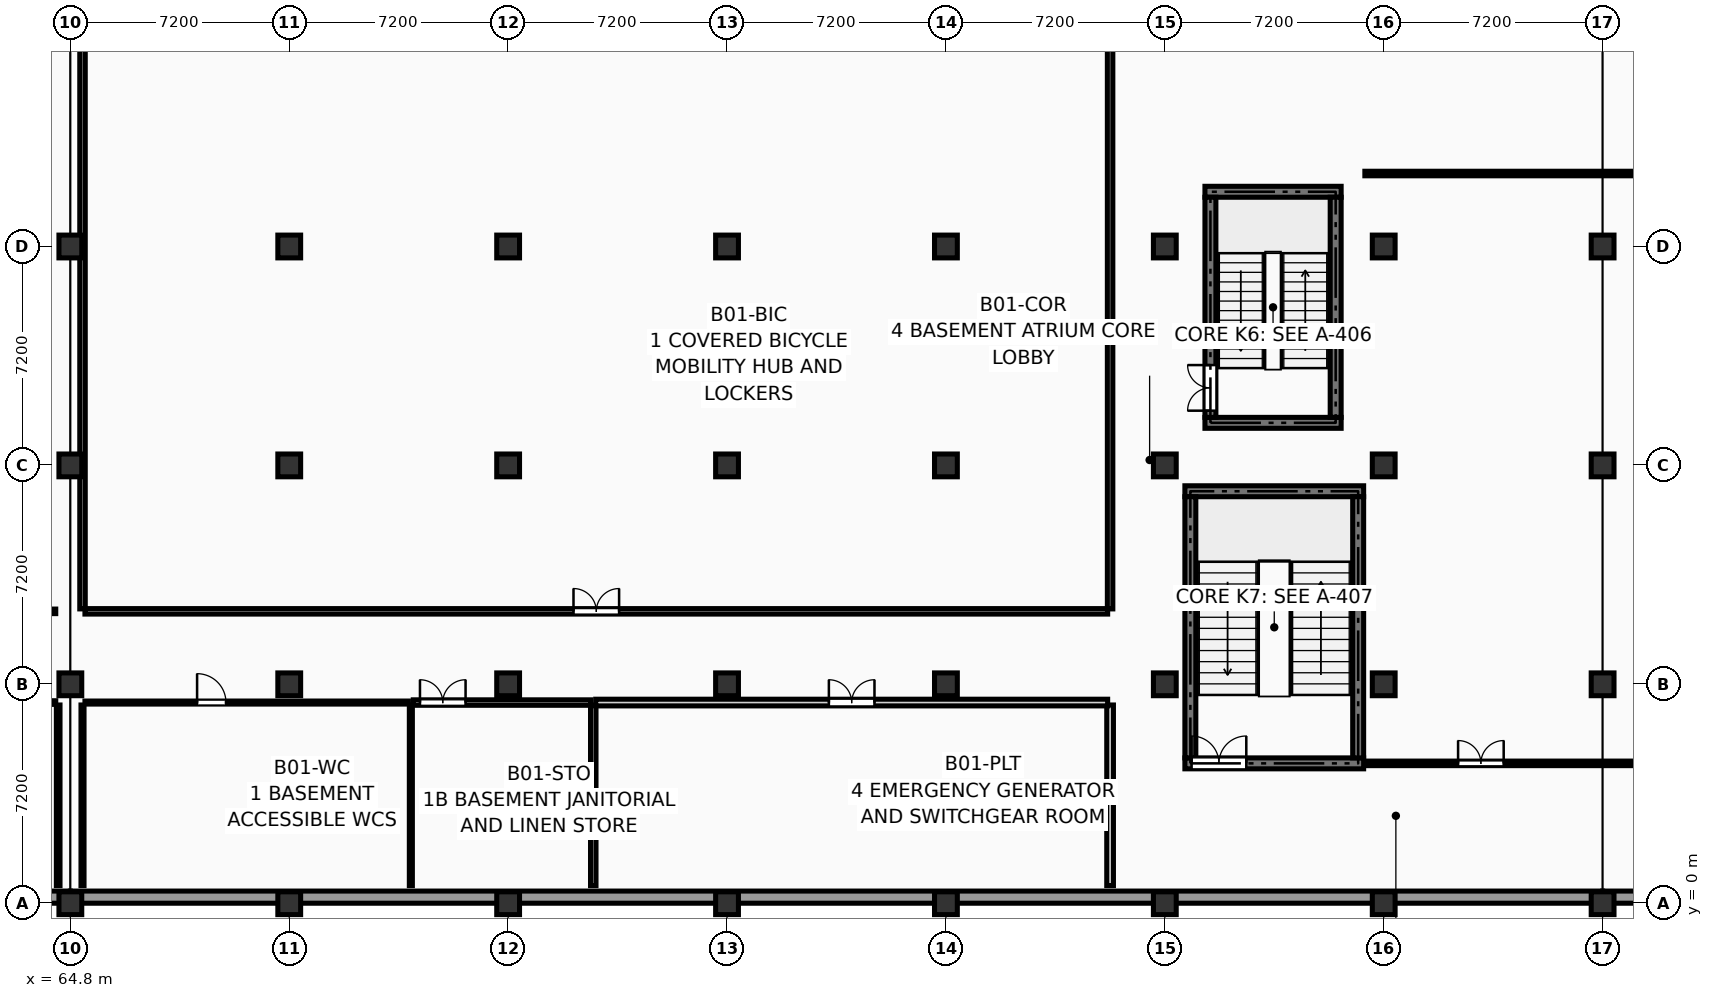
"""IFC4 building model, lengths in metres.
Left out: names, types, materials, properties, quantities, classifications, styles, units other than length and angle.
Written with IfcOpenShell. Run it as: python <this file> out.ifc"""

import sys

from ifc_helpers import new_model, si_unit, direction, frame, frame_2d, origin, origin_2d, place, context, subcontext, project, spatial, rectangle, extrude, element, fill, save


model = new_model("IFC4")
c1 = context("Model", 3, precision=1e-05, world=origin(), true_north=direction((0.0, 1.0)))
c2 = subcontext(c1, "Body", "Model", "MODEL_VIEW")
j1 = project(units=[si_unit("LENGTHUNIT", "METRE"), si_unit("PLANEANGLEUNIT", "RADIAN")], contexts=[c1])
p1 = place(None, origin())
s1 = spatial("IfcSite", under=j1, at=p1, CompositionType="ELEMENT")
p2 = place(p1, origin())
s2 = spatial("IfcBuilding", under=s1, at=p2, CompositionType="ELEMENT")
p3 = place(p2, frame((0.0, 0.0, -4.5)))
s3 = spatial("IfcBuildingStorey", under=s2, at=p3, CompositionType="ELEMENT", Elevation=-4.5)
for number, where, z_axis, x_axis in (
    (1, (64.8, 0.0, -0.3), (0.0, 0.0, 1.0), (1.0, 0.0, 0.0)),
    (2, (64.8, 7.2, -0.3), (0.0, 0.0, 1.0), (1.0, 0.0, 0.0)),
    (3, (64.8, 14.4, -0.3), (0.0, 0.0, 1.0), (1.0, 0.0, 0.0)),
    (4, (64.8, 21.6, -0.3), (0.0, 0.0, 1.0), (1.0, 0.0, 0.0)),
    (5, (72.0, 0.0, -0.3), (0.0, 0.0, 1.0), (1.0, 0.0, 0.0)),
    (6, (72.0, 7.2, -0.3), (0.0, 0.0, 1.0), (1.0, 0.0, 0.0)),
    (7, (72.0, 14.4, -0.3), (0.0, 0.0, 1.0), (1.0, 0.0, 0.0)),
    (8, (72.0, 21.6, -0.3), (0.0, 0.0, 1.0), (1.0, 0.0, 0.0)),
    (9, (79.2, 0.0, -0.3), (0.0, 0.0, 1.0), (1.0, 0.0, 0.0)),
    (10, (79.2, 7.2, -0.3), (0.0, 0.0, 1.0), (1.0, 0.0, 0.0)),
    (11, (79.2, 14.4, -0.3), (0.0, 0.0, 1.0), (1.0, 0.0, 0.0)),
    (12, (79.2, 21.6, -0.3), (0.0, 0.0, 1.0), (1.0, 0.0, 0.0)),
    (13, (86.4, 0.0, -0.3), (0.0, 0.0, 1.0), (1.0, 0.0, 0.0)),
    (14, (86.4, 7.2, -0.3), (0.0, 0.0, 1.0), (1.0, 0.0, 0.0)),
    (15, (86.4, 14.4, -0.3), (0.0, 0.0, 1.0), (1.0, 0.0, 0.0)),
    (16, (86.4, 21.6, -0.3), (0.0, 0.0, 1.0), (1.0, 0.0, 0.0)),
    (17, (93.6, 0.0, -0.3), (0.0, 0.0, 1.0), (1.0, 0.0, 0.0)),
    (18, (93.6, 7.2, -0.3), (0.0, 0.0, 1.0), (1.0, 0.0, 0.0)),
    (19, (93.6, 14.4, -0.3), (0.0, 0.0, 1.0), (1.0, 0.0, 0.0)),
    (20, (93.6, 21.6, -0.3), (0.0, 0.0, 1.0), (1.0, 0.0, 0.0)),
    (21, (100.8, 0.0, -0.3), (0.0, 0.0, 1.0), (1.0, 0.0, 0.0)),
):
    element("IfcColumn", number, at=place(p3, frame(where, z_axis=z_axis, x_axis=x_axis)), inside=s3, PredefinedType="COLUMN", context=c2, shape_type="SweptSolid", body=[
        extrude(rectangle(XDim=0.75, YDim=0.75, at=origin_2d()), origin(), (0.0, 0.0, 1.0), 4.8),
    ])
for number, where, z_axis, x_axis in (
    (22, (100.8, 7.2, 0.0), (0.0, 0.0, 1.0), (1.0, 0.0, 0.0)),
    (23, (100.8, 14.4, 0.0), (0.0, 0.0, 1.0), (1.0, 0.0, 0.0)),
    (24, (100.8, 21.6, 0.0), (0.0, 0.0, 1.0), (1.0, 0.0, 0.0)),
):
    element("IfcColumn", number, at=place(p3, frame(where, z_axis=z_axis, x_axis=x_axis)), inside=s3, PredefinedType="COLUMN", context=c2, shape_type="SweptSolid", body=[
        extrude(rectangle(XDim=0.75, YDim=0.75, at=origin_2d()), origin(), (0.0, 0.0, 1.0), 4.5),
    ])
p4 = place(p3, frame((108.0, 0.0, -0.3), z_axis=(0.0, 0.0, 1.0), x_axis=(1.0, 0.0, 0.0)))
e25 = element("IfcColumn", 25, at=p4, inside=s3, PredefinedType="COLUMN", context=c2, shape_type="SweptSolid", body=[
    extrude(rectangle(XDim=0.75, YDim=0.75, at=origin_2d()), origin(), (0.0, 0.0, 1.0), 4.8),
])
for number, where, z_axis, x_axis in (
    (26, (108.0, 7.2, 0.0), (0.0, 0.0, 1.0), (1.0, 0.0, 0.0)),
    (27, (108.0, 14.4, 0.0), (0.0, 0.0, 1.0), (1.0, 0.0, 0.0)),
    (28, (108.0, 21.6, 0.0), (0.0, 0.0, 1.0), (1.0, 0.0, 0.0)),
):
    element("IfcColumn", number, at=place(p3, frame(where, z_axis=z_axis, x_axis=x_axis)), inside=s3, PredefinedType="COLUMN", context=c2, shape_type="SweptSolid", body=[
        extrude(rectangle(XDim=0.75, YDim=0.75, at=origin_2d()), origin(), (0.0, 0.0, 1.0), 4.5),
    ])
for number, where, z_axis, x_axis in (
    (29, (115.2, 0.0, -0.3), (0.0, 0.0, 1.0), (1.0, 0.0, 0.0)),
    (30, (115.2, 7.2, -0.3), (0.0, 0.0, 1.0), (1.0, 0.0, 0.0)),
    (31, (115.2, 14.4, -0.3), (0.0, 0.0, 1.0), (1.0, 0.0, 0.0)),
    (32, (115.2, 21.6, -0.3), (0.0, 0.0, 1.0), (1.0, 0.0, 0.0)),
):
    element("IfcColumn", number, at=place(p3, frame(where, z_axis=z_axis, x_axis=x_axis)), inside=s3, PredefinedType="COLUMN", context=c2, shape_type="SweptSolid", body=[
        extrude(rectangle(XDim=0.75, YDim=0.75, at=origin_2d()), origin(), (0.0, 0.0, 1.0), 4.8),
    ])
p5 = place(p3, frame((165.6, 0.2, -0.3), z_axis=(0.0, 0.0, 1.0), x_axis=(-1.0, 0.0, 0.0)))
e33 = element("IfcWall", 33, at=p5, inside=s3, PredefinedType="USERDEFINED", context=c2, shape_type="SweptSolid", body=[
    extrude(rectangle(XDim=50.4, YDim=0.4, at=frame_2d((25.2, 0.0))), origin(), (0.0, 0.0, 1.0), 4.54),
])
p6 = place(p3, frame((115.2, 0.2, -0.3), z_axis=(0.0, 0.0, 1.0), x_axis=(-1.0, 0.0, 0.0)))
e34 = element("IfcWall", 34, at=p6, inside=s3, PredefinedType="USERDEFINED", context=c2, shape_type="SweptSolid", body=[
    extrude(rectangle(XDim=50.4, YDim=0.4, at=frame_2d((25.2, 0.0))), origin(), (0.0, 0.0, 1.0), 4.54),
])
p7 = place(p3, frame((64.8, 0.2, -0.3), z_axis=(0.0, 0.0, 1.0), x_axis=(-1.0, 0.0, 0.0)))
e35 = element("IfcWall", 35, at=p7, inside=s3, PredefinedType="USERDEFINED", context=c2, shape_type="SweptSolid", body=[
    extrude(rectangle(XDim=36.0, YDim=0.4, at=frame_2d((18.0, 0.0))), origin(), (0.0, 0.0, 1.0), 4.54),
])
for number, where, z_axis, x_axis in (
    (36, (102.12, 15.8, -0.3), (0.0, 0.0, 1.0), (1.0, 0.0, 0.0)),
    (37, (102.12, 23.4, -0.3), (0.0, 0.0, 1.0), (1.0, 0.0, 0.0)),
):
    element("IfcWall", number, at=place(p3, frame(where, z_axis=z_axis, x_axis=x_axis)), inside=s3, PredefinedType="SHEAR", context=c2, shape_type="SweptSolid", body=[
        extrude(rectangle(XDim=4.48, YDim=0.36, at=frame_2d((2.24, 0.0))), origin(), (0.0, 0.0, 1.0), 4.54),
    ])
p8 = place(p3, frame((102.3, 15.98, -0.3), z_axis=(0.0, 0.0, 1.0), x_axis=(0.0, 1.0, 0.0)))
e38 = element("IfcWall", 38, at=p8, inside=s3, PredefinedType="SHEAR", context=c2, shape_type="SweptSolid", body=[
    extrude(rectangle(XDim=7.24, YDim=0.36, at=frame_2d((3.62, 0.0))), origin(), (0.0, 0.0, 1.0), 4.54),
])
p9 = place(p8, frame((0.22, 0.0, 0.3)))
e39 = element("IfcOpeningElement", 39, at=p9, cuts=e38, PredefinedType="OPENING", context=c2, shape_type="SweptSolid", body=[
    extrude(rectangle(XDim=1.5, YDim=2.2, at=frame_2d((0.75, 1.1))), frame((0.0, 0.192, 0.0), z_axis=(0.0, -1.0, 0.0), x_axis=(1.0, 0.0, 0.0)), (0.0, 0.0, 1.0), 0.384),
])
p10 = place(p3, frame((106.42, 15.98, -0.3), z_axis=(0.0, 0.0, 1.0), x_axis=(0.0, 1.0, 0.0)))
e40 = element("IfcWall", 40, at=p10, inside=s3, PredefinedType="SHEAR", context=c2, shape_type="SweptSolid", body=[
    extrude(rectangle(XDim=7.24, YDim=0.36, at=frame_2d((3.62, 0.0))), origin(), (0.0, 0.0, 1.0), 4.54),
])
p11 = place(p3, frame((101.46, 4.6, -0.3), z_axis=(0.0, 0.0, 1.0), x_axis=(1.0, 0.0, 0.0)))
e41 = element("IfcWall", 41, at=p11, inside=s3, PredefinedType="SHEAR", context=c2, shape_type="SweptSolid", body=[
    extrude(rectangle(XDim=5.88, YDim=0.36, at=frame_2d((2.94, 0.0))), origin(), (0.0, 0.0, 1.0), 4.54),
])
p12 = place(p11, frame((0.22, 0.0, 0.3)))
e42 = element("IfcOpeningElement", 42, at=p12, cuts=e41, PredefinedType="OPENING", context=c2, shape_type="SweptSolid", body=[
    extrude(rectangle(XDim=1.8, YDim=2.2, at=frame_2d((0.9, 1.1))), frame((0.0, 0.192, 0.0), z_axis=(0.0, -1.0, 0.0), x_axis=(1.0, 0.0, 0.0)), (0.0, 0.0, 1.0), 0.384),
])
p13 = place(p3, frame((101.46, 13.55, -0.3), z_axis=(0.0, 0.0, 1.0), x_axis=(1.0, 0.0, 0.0)))
e43 = element("IfcWall", 43, at=p13, inside=s3, PredefinedType="SHEAR", context=c2, shape_type="SweptSolid", body=[
    extrude(rectangle(XDim=5.88, YDim=0.36, at=frame_2d((2.94, 0.0))), origin(), (0.0, 0.0, 1.0), 4.54),
])
for number, where, z_axis, x_axis in (
    (44, (101.64, 4.78, -0.3), (0.0, 0.0, 1.0), (0.0, 1.0, 0.0)),
    (45, (107.16, 4.78, -0.3), (0.0, 0.0, 1.0), (0.0, 1.0, 0.0)),
):
    element("IfcWall", number, at=place(p3, frame(where, z_axis=z_axis, x_axis=x_axis)), inside=s3, PredefinedType="SHEAR", context=c2, shape_type="SweptSolid", body=[
        extrude(rectangle(XDim=8.59, YDim=0.36, at=frame_2d((4.295, 0.0))), origin(), (0.0, 0.0, 1.0), 4.54),
    ])
p14 = place(p3, frame((46.88, 9.6, 0.0), z_axis=(0.0, 0.0, 1.0), x_axis=(1.0, 0.0, 0.0)))
e46 = element("IfcWall", 46, at=p14, inside=s3, PredefinedType="PARTITIONING", context=c2, shape_type="SweptSolid", body=[
    extrude(rectangle(XDim=17.44, YDim=0.15, at=frame_2d((8.72, 0.0))), origin(), (0.0, 0.0, 1.0), 4.225),
])
p15 = place(p14, frame((7.97, 0.0, 0.0)))
e47 = element("IfcOpeningElement", 47, at=p15, cuts=e46, PredefinedType="OPENING", context=c2, shape_type="SweptSolid", body=[
    extrude(rectangle(XDim=1.5, YDim=2.2, at=frame_2d((0.75, 1.1))), frame((0.0, 0.087, 0.0), z_axis=(0.0, -1.0, 0.0), x_axis=(1.0, 0.0, 0.0)), (0.0, 0.0, 1.0), 0.174),
])
p16 = place(p3, frame((64.4, 0.58, 0.0), z_axis=(0.0, 0.0, 1.0), x_axis=(0.0, 1.0, 0.0)))
e48 = element("IfcWall", 48, at=p16, inside=s3, PredefinedType="PARTITIONING", context=c2, shape_type="SweptSolid", body=[
    extrude(rectangle(XDim=5.94, YDim=0.12, at=frame_2d((2.97, 0.0))), origin(), (0.0, 0.0, 1.0), 3.375),
])
p17 = place(p3, frame((15.88, 6.6, 0.0), z_axis=(0.0, 0.0, 1.0), x_axis=(1.0, 0.0, 0.0)))
e49 = element("IfcWall", 49, at=p17, inside=s3, PredefinedType="PARTITIONING", context=c2, shape_type="SweptSolid", body=[
    extrude(rectangle(XDim=48.44, YDim=0.12, at=frame_2d((24.22, 0.0))), origin(), (0.0, 0.0, 1.0), 4.225),
])
p18 = place(p3, frame((65.2, 9.68, 0.0), z_axis=(0.0, 0.0, 1.0), x_axis=(0.0, 1.0, 0.0)))
e50 = element("IfcWall", 50, at=p18, inside=s3, PredefinedType="PARTITIONING", context=c2, shape_type="SweptSolid", body=[
    extrude(rectangle(XDim=18.44, YDim=0.18, at=frame_2d((9.22, 0.0))), origin(), (0.0, 0.0, 1.0), 3.375),
])
p19 = place(p3, frame((65.28, 9.6, 0.0), z_axis=(0.0, 0.0, 1.0), x_axis=(1.0, 0.0, 0.0)))
e51 = element("IfcWall", 51, at=p19, inside=s3, PredefinedType="PARTITIONING", context=c2, shape_type="SweptSolid", body=[
    extrude(rectangle(XDim=33.64, YDim=0.18, at=frame_2d((16.82, 0.0))), origin(), (0.0, 0.0, 1.0), 4.225),
])
p20 = place(p19, frame((16.07, 0.0, 0.0)))
e52 = element("IfcOpeningElement", 52, at=p20, cuts=e51, PredefinedType="OPENING", context=c2, shape_type="SweptSolid", body=[
    extrude(rectangle(XDim=1.5, YDim=2.25, at=frame_2d((0.75, 1.125))), frame((0.0, 0.102, 0.0), z_axis=(0.0, -1.0, 0.0), x_axis=(1.0, 0.0, 0.0)), (0.0, 0.0, 1.0), 0.204),
])
p21 = place(p3, frame((99.0, 9.68, 0.0), z_axis=(0.0, 0.0, 1.0), x_axis=(0.0, 1.0, 0.0)))
e53 = element("IfcWall", 53, at=p21, inside=s3, PredefinedType="PARTITIONING", context=c2, shape_type="SweptSolid", body=[
    extrude(rectangle(XDim=18.44, YDim=0.18, at=frame_2d((9.22, 0.0))), origin(), (0.0, 0.0, 1.0), 4.225),
])
p22 = place(p3, frame((65.2, 0.58, 0.0), z_axis=(0.0, 0.0, 1.0), x_axis=(0.0, 1.0, 0.0)))
e54 = element("IfcWall", 54, at=p22, inside=s3, PredefinedType="PARTITIONING", context=c2, shape_type="SweptSolid", body=[
    extrude(rectangle(XDim=5.94, YDim=0.1, at=frame_2d((2.97, 0.0))), origin(), (0.0, 0.0, 1.0), 3.375),
])
p23 = place(p3, frame((76.0, 0.58, 0.0), z_axis=(0.0, 0.0, 1.0), x_axis=(0.0, 1.0, 0.0)))
e55 = element("IfcWall", 55, at=p23, inside=s3, PredefinedType="PARTITIONING", context=c2, shape_type="SweptSolid", body=[
    extrude(rectangle(XDim=5.94, YDim=0.1, at=frame_2d((2.97, 0.0))), origin(), (0.0, 0.0, 1.0), 4.225),
])
p24 = place(p3, frame((65.28, 6.6, 0.0), z_axis=(0.0, 0.0, 1.0), x_axis=(1.0, 0.0, 0.0)))
e56 = element("IfcWall", 56, at=p24, inside=s3, PredefinedType="PARTITIONING", context=c2, shape_type="SweptSolid", body=[
    extrude(rectangle(XDim=10.64, YDim=0.1, at=frame_2d((5.32, 0.0))), origin(), (0.0, 0.0, 1.0), 4.225),
])
p25 = place(p24, frame((3.689, 0.0, 0.0)))
e57 = element("IfcOpeningElement", 57, at=p25, cuts=e56, PredefinedType="OPENING", context=c2, shape_type="SweptSolid", body=[
    extrude(rectangle(XDim=0.95, YDim=2.1, at=frame_2d((0.475, 1.05))), frame((0.0, 0.062, 0.0), z_axis=(0.0, -1.0, 0.0), x_axis=(1.0, 0.0, 0.0)), (0.0, 0.0, 1.0), 0.124),
])
p26 = place(p3, frame((82.0, 0.58, 0.0), z_axis=(0.0, 0.0, 1.0), x_axis=(0.0, 1.0, 0.0)))
e58 = element("IfcWall", 58, at=p26, inside=s3, PredefinedType="PARTITIONING", context=c2, shape_type="SweptSolid", body=[
    extrude(rectangle(XDim=5.94, YDim=0.18, at=frame_2d((2.97, 0.0))), origin(), (0.0, 0.0, 1.0), 4.225),
])
p27 = place(p3, frame((76.08, 6.6, 0.0), z_axis=(0.0, 0.0, 1.0), x_axis=(1.0, 0.0, 0.0)))
e59 = element("IfcWall", 59, at=p27, inside=s3, PredefinedType="PARTITIONING", context=c2, shape_type="SweptSolid", body=[
    extrude(rectangle(XDim=5.84, YDim=0.18, at=frame_2d((2.92, 0.0))), origin(), (0.0, 0.0, 1.0), 4.225),
])
p28 = place(p27, frame((0.22, 0.0, 0.0)))
e60 = element("IfcOpeningElement", 60, at=p28, cuts=e59, PredefinedType="OPENING", context=c2, shape_type="SweptSolid", body=[
    extrude(rectangle(XDim=1.5, YDim=2.25, at=frame_2d((0.75, 1.125))), frame((0.0, 0.102, 0.0), z_axis=(0.0, -1.0, 0.0), x_axis=(1.0, 0.0, 0.0)), (0.0, 0.0, 1.0), 0.204),
])
p29 = place(p3, frame((99.0, 0.58, 0.0), z_axis=(0.0, 0.0, 1.0), x_axis=(0.0, 1.0, 0.0)))
e61 = element("IfcWall", 61, at=p29, inside=s3, PredefinedType="PARTITIONING", context=c2, shape_type="SweptSolid", body=[
    extrude(rectangle(XDim=5.94, YDim=0.22, at=frame_2d((2.97, 0.0))), origin(), (0.0, 0.0, 1.0), 4.225),
])
p30 = place(p3, frame((82.08, 6.6, 0.0), z_axis=(0.0, 0.0, 1.0), x_axis=(1.0, 0.0, 0.0)))
e62 = element("IfcWall", 62, at=p30, inside=s3, PredefinedType="PARTITIONING", context=c2, shape_type="SweptSolid", body=[
    extrude(rectangle(XDim=16.84, YDim=0.22, at=frame_2d((8.42, 0.0))), origin(), (0.0, 0.0, 1.0), 4.225),
])
p31 = place(p30, frame((7.67, 0.0, 0.0)))
e63 = element("IfcOpeningElement", 63, at=p31, cuts=e62, PredefinedType="OPENING", context=c2, shape_type="SweptSolid", body=[
    extrude(rectangle(XDim=1.5, YDim=2.25, at=frame_2d((0.75, 1.125))), frame((0.0, 0.122, 0.0), z_axis=(0.0, -1.0, 0.0), x_axis=(1.0, 0.0, 0.0)), (0.0, 0.0, 1.0), 0.244),
])
p32 = place(p3, frame((107.38, 4.6, 0.0), z_axis=(0.0, 0.0, 1.0), x_axis=(1.0, 0.0, 0.0)))
e64 = element("IfcWall", 64, at=p32, inside=s3, PredefinedType="PARTITIONING", context=c2, shape_type="SweptSolid", body=[
    extrude(rectangle(XDim=29.34, YDim=0.15, at=frame_2d((14.67, 0.0))), origin(), (0.0, 0.0, 1.0), 4.225),
])
p33 = place(p32, frame((3.066, 0.0, 0.0)))
e65 = element("IfcOpeningElement", 65, at=p33, cuts=e64, PredefinedType="OPENING", context=c2, shape_type="SweptSolid", body=[
    extrude(rectangle(XDim=1.5, YDim=2.2, at=frame_2d((0.75, 1.1))), frame((0.0, 0.087, 0.0), z_axis=(0.0, -1.0, 0.0), x_axis=(1.0, 0.0, 0.0)), (0.0, 0.0, 1.0), 0.174),
])
p34 = place(p3, frame((107.38, 24.0, 0.0), z_axis=(0.0, 0.0, 1.0), x_axis=(1.0, 0.0, 0.0)))
e66 = element("IfcWall", 66, at=p34, inside=s3, PredefinedType="PARTITIONING", context=c2, shape_type="SweptSolid", body=[
    extrude(rectangle(XDim=29.34, YDim=0.15, at=frame_2d((14.67, 0.0))), origin(), (0.0, 0.0, 1.0), 4.225),
])
p35 = place(p9, origin())
e67 = element("IfcDoor", 67, at=p35, inside=s3, OperationType="DOUBLE_DOOR_SINGLE_SWING", PredefinedType="DOOR", context=c2, shape_type="SweptSolid", body=[
    extrude(rectangle(XDim=1.5, YDim=2.2, at=frame_2d((0.75, 1.1))), frame((0.0, 0.025, 0.0), z_axis=(0.0, -1.0, 0.0), x_axis=(1.0, 0.0, 0.0)), (0.0, 0.0, 1.0), 0.05),
])
fill(e39, e67)
p36 = place(p12, origin())
e68 = element("IfcDoor", 68, at=p36, inside=s3, OperationType="DOUBLE_DOOR_SINGLE_SWING", PredefinedType="DOOR", context=c2, shape_type="SweptSolid", body=[
    extrude(rectangle(XDim=1.8, YDim=2.2, at=frame_2d((0.9, 1.1))), frame((0.0, 0.025, 0.0), z_axis=(0.0, -1.0, 0.0), x_axis=(1.0, 0.0, 0.0)), (0.0, 0.0, 1.0), 0.05),
])
fill(e42, e68)
p37 = place(p20, origin())
e69 = element("IfcDoor", 69, at=p37, inside=s3, OperationType="DOUBLE_DOOR_SINGLE_SWING", PredefinedType="DOOR", context=c2, shape_type="SweptSolid", body=[
    extrude(rectangle(XDim=1.5, YDim=2.25, at=frame_2d((0.75, 1.125))), frame((0.0, 0.025, 0.0), z_axis=(0.0, -1.0, 0.0), x_axis=(1.0, 0.0, 0.0)), (0.0, 0.0, 1.0), 0.05),
])
fill(e52, e69)
p38 = place(p25, origin())
e70 = element("IfcDoor", 70, at=p38, inside=s3, OperationType="SINGLE_SWING_LEFT", PredefinedType="DOOR", context=c2, shape_type="SweptSolid", body=[
    extrude(rectangle(XDim=0.95, YDim=2.1, at=frame_2d((0.475, 1.05))), frame((0.0, 0.025, 0.0), z_axis=(0.0, -1.0, 0.0), x_axis=(1.0, 0.0, 0.0)), (0.0, 0.0, 1.0), 0.05),
])
fill(e57, e70)
p39 = place(p28, origin())
e71 = element("IfcDoor", 71, at=p39, inside=s3, OperationType="DOUBLE_DOOR_SINGLE_SWING", PredefinedType="DOOR", context=c2, shape_type="SweptSolid", body=[
    extrude(rectangle(XDim=1.5, YDim=2.25, at=frame_2d((0.75, 1.125))), frame((0.0, 0.025, 0.0), z_axis=(0.0, -1.0, 0.0), x_axis=(1.0, 0.0, 0.0)), (0.0, 0.0, 1.0), 0.05),
])
fill(e60, e71)
p40 = place(p31, origin())
e72 = element("IfcDoor", 72, at=p40, inside=s3, OperationType="DOUBLE_DOOR_SINGLE_SWING", PredefinedType="DOOR", context=c2, shape_type="SweptSolid", body=[
    extrude(rectangle(XDim=1.5, YDim=2.25, at=frame_2d((0.75, 1.125))), frame((0.0, 0.025, 0.0), z_axis=(0.0, -1.0, 0.0), x_axis=(1.0, 0.0, 0.0)), (0.0, 0.0, 1.0), 0.05),
])
fill(e63, e72)
p41 = place(p33, origin())
e73 = element("IfcDoor", 73, at=p41, inside=s3, OperationType="DOUBLE_DOOR_SINGLE_SWING", PredefinedType="DOOR", context=c2, shape_type="SweptSolid", body=[
    extrude(rectangle(XDim=1.5, YDim=2.2, at=frame_2d((0.75, 1.1))), frame((0.0, 0.025, 0.0), z_axis=(0.0, -1.0, 0.0), x_axis=(1.0, 0.0, 0.0)), (0.0, 0.0, 1.0), 0.05),
])
fill(e65, e73)
save(model, sys.argv[1])
